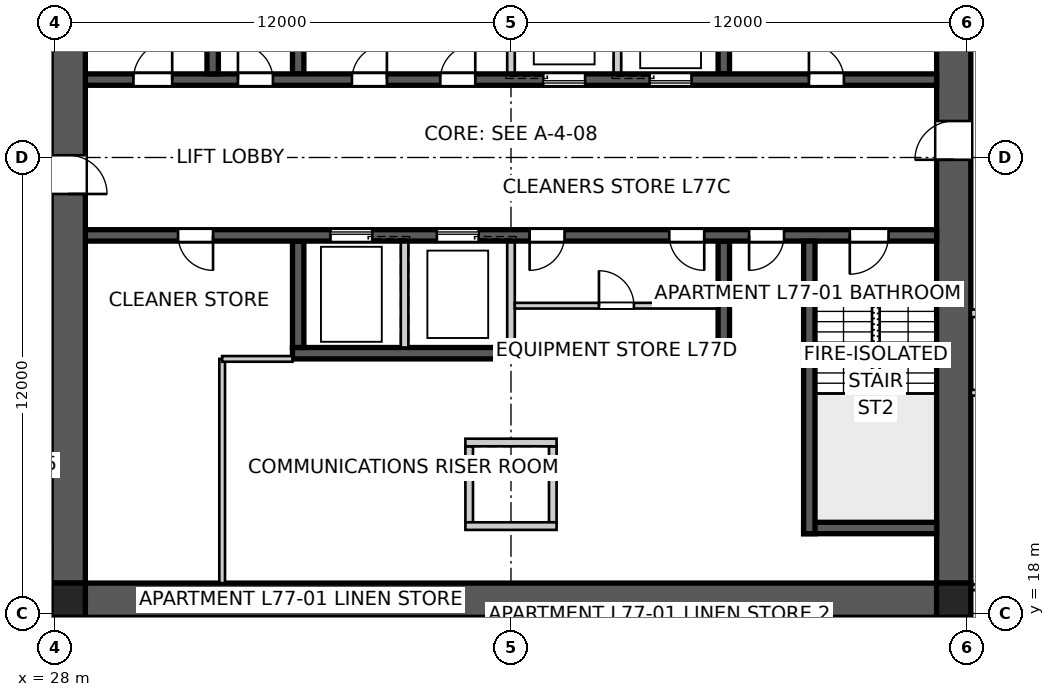
"""IFC4 building model, lengths in metres.
Left out: names, types, materials, properties, quantities, classifications, styles, units other than length and angle.
Written with IfcOpenShell. Run it as: python <this file> out.ifc"""

import sys

from ifc_helpers import new_model, si_unit, direction, frame, frame_2d, origin, origin_2d, place, context, subcontext, project, spatial, polyline, rectangle, outline, extrude, element, fill, save


model = new_model("IFC4")
c1 = context("Model", 3, precision=1e-05, world=origin(), true_north=direction((0.0, 1.0)))
c2 = subcontext(c1, "Body", "Model", "MODEL_VIEW")
j1 = project(units=[si_unit("LENGTHUNIT", "METRE"), si_unit("PLANEANGLEUNIT", "RADIAN")], contexts=[c1])
p1 = place(None, origin())
s1 = spatial("IfcSite", under=j1, at=p1, CompositionType="ELEMENT")
p2 = place(p1, origin())
s2 = spatial("IfcBuilding", under=s1, at=p2, CompositionType="ELEMENT")
p3 = place(p2, frame((0.0, 0.0, 279.4)))
s3 = spatial("IfcBuildingStorey", under=s2, at=p3, CompositionType="ELEMENT", Elevation=279.4)
p4 = place(p3, frame((51.2, 18.35, 0.0), z_axis=(0.0, 0.0, 1.0), x_axis=(-1.0, 0.0, 0.0)))
e1 = element("IfcWall", 1, at=p4, inside=s3, PredefinedType="SHEAR", context=c2, shape_type="SweptSolid", body=[
    extrude(outline(polyline([(0.0, -0.45), (22.4, -0.45), (22.4, -0.025), (22.85, -0.025), (22.85, 0.025), (22.4, 0.025), (22.4, 0.45), (0.0, 0.45), (0.0, 0.025), (-0.45, 0.025), (-0.45, -0.025), (0.0, -0.025), (0.0, -0.45)])), origin(), (0.0, 0.0, 1.0), 3.4),
])
p5 = place(p3, frame((51.65, 18.8, 0.0), z_axis=(0.0, 0.0, 1.0), x_axis=(0.0, 1.0, 0.0)))
e2 = element("IfcWall", 2, at=p5, inside=s3, PredefinedType="SHEAR", context=c2, shape_type="SweptSolid", body=[
    extrude(outline(polyline([(0.0, -0.45), (22.4, -0.45), (22.4, -0.025), (22.85, -0.025), (22.85, 0.025), (22.4, 0.025), (22.4, 0.45), (0.0, 0.45), (0.0, 0.025), (-0.45, 0.025), (-0.45, -0.025), (0.0, -0.025), (0.0, -0.45)])), origin(), (0.0, 0.0, 1.0), 3.4),
])
p6 = place(p5, frame((11.14, 0.0, 0.0)))
e3 = element("IfcOpeningElement", 3, at=p6, cuts=e2, PredefinedType="OPENING", context=c2, shape_type="SweptSolid", body=[
    extrude(rectangle(XDim=1.02, YDim=2.4, at=frame_2d((0.51, 1.2))), frame((0.0, 0.46, 0.0), z_axis=(0.0, -1.0, 0.0), x_axis=(1.0, 0.0, 0.0)), (0.0, 0.0, 1.0), 0.92),
])
p7 = place(p3, frame((28.35, 41.2, 0.0), z_axis=(0.0, 0.0, 1.0), x_axis=(0.0, -1.0, 0.0)))
e4 = element("IfcWall", 4, at=p7, inside=s3, PredefinedType="SHEAR", context=c2, shape_type="SweptSolid", body=[
    extrude(outline(polyline([(0.0, -0.45), (22.4, -0.45), (22.4, -0.025), (22.85, -0.025), (22.85, 0.025), (22.4, 0.025), (22.4, 0.45), (0.0, 0.45), (0.0, 0.025), (-0.45, 0.025), (-0.45, -0.025), (0.0, -0.025), (0.0, -0.45)])), origin(), (0.0, 0.0, 1.0), 3.4),
])
p8 = place(p7, frame((11.14, 0.0, 0.0)))
e5 = element("IfcOpeningElement", 5, at=p8, cuts=e4, PredefinedType="OPENING", context=c2, shape_type="SweptSolid", body=[
    extrude(rectangle(XDim=1.02, YDim=2.4, at=frame_2d((0.51, 1.2))), frame((0.0, 0.46, 0.0), z_axis=(0.0, -1.0, 0.0), x_axis=(1.0, 0.0, 0.0)), (0.0, 0.0, 1.0), 0.92),
])
p9 = place(p3, frame((28.8, 32.05, 0.0), z_axis=(0.0, 0.0, 1.0), x_axis=(1.0, 0.0, 0.0)))
e6 = element("IfcWall", 6, at=p9, inside=s3, PredefinedType="SHEAR", context=c2, shape_type="SweptSolid", body=[
    extrude(rectangle(XDim=22.4, YDim=0.3, at=frame_2d((11.2, 0.0))), origin(), (0.0, 0.0, 1.0), 3.4),
])
p10 = place(p9, frame((19.04, 0.0, 0.0)))
e7 = element("IfcOpeningElement", 7, at=p10, cuts=e6, PredefinedType="OPENING", context=c2, shape_type="SweptSolid", body=[
    extrude(rectangle(XDim=0.92, YDim=2.1, at=frame_2d((0.46, 1.05))), frame((0.0, 0.16, 0.0), z_axis=(0.0, -1.0, 0.0), x_axis=(1.0, 0.0, 0.0)), (0.0, 0.0, 1.0), 0.32),
])
p11 = place(p9, frame((1.265, 0.0, 0.0)))
e8 = element("IfcOpeningElement", 8, at=p11, cuts=e6, PredefinedType="OPENING", context=c2, shape_type="SweptSolid", body=[
    extrude(rectangle(XDim=1.02, YDim=2.1, at=frame_2d((0.51, 1.05))), frame((0.0, 0.16, 0.0), z_axis=(0.0, -1.0, 0.0), x_axis=(1.0, 0.0, 0.0)), (0.0, 0.0, 1.0), 0.32),
])
p12 = place(p9, frame((4.015, 0.0, 0.0)))
e9 = element("IfcOpeningElement", 9, at=p12, cuts=e6, PredefinedType="OPENING", context=c2, shape_type="SweptSolid", body=[
    extrude(rectangle(XDim=0.92, YDim=2.1, at=frame_2d((0.46, 1.05))), frame((0.0, 0.16, 0.0), z_axis=(0.0, -1.0, 0.0), x_axis=(1.0, 0.0, 0.0)), (0.0, 0.0, 1.0), 0.32),
])
p13 = place(p9, frame((7.015, 0.0, 0.0)))
e10 = element("IfcOpeningElement", 10, at=p13, cuts=e6, PredefinedType="OPENING", context=c2, shape_type="SweptSolid", body=[
    extrude(rectangle(XDim=0.92, YDim=2.1, at=frame_2d((0.46, 1.05))), frame((0.0, 0.16, 0.0), z_axis=(0.0, -1.0, 0.0), x_axis=(1.0, 0.0, 0.0)), (0.0, 0.0, 1.0), 0.32),
])
p14 = place(p9, frame((9.34, 0.0, 0.0)))
e11 = element("IfcOpeningElement", 11, at=p14, cuts=e6, PredefinedType="OPENING", context=c2, shape_type="SweptSolid", body=[
    extrude(rectangle(XDim=0.92, YDim=2.1, at=frame_2d((0.46, 1.05))), frame((0.0, 0.16, 0.0), z_axis=(0.0, -1.0, 0.0), x_axis=(1.0, 0.0, 0.0)), (0.0, 0.0, 1.0), 0.32),
])
p15 = place(p9, frame((12.05, 0.0, 0.0)))
e12 = element("IfcOpeningElement", 12, at=p15, cuts=e6, PredefinedType="OPENING", context=c2, shape_type="SweptSolid", body=[
    extrude(rectangle(XDim=1.1, YDim=2.1, at=frame_2d((0.55, 1.05))), frame((0.0, 0.16, 0.0), z_axis=(0.0, -1.0, 0.0), x_axis=(1.0, 0.0, 0.0)), (0.0, 0.0, 1.0), 0.32),
])
p16 = place(p9, frame((14.85, 0.0, 0.0)))
e13 = element("IfcOpeningElement", 13, at=p16, cuts=e6, PredefinedType="OPENING", context=c2, shape_type="SweptSolid", body=[
    extrude(rectangle(XDim=1.1, YDim=2.1, at=frame_2d((0.55, 1.05))), frame((0.0, 0.16, 0.0), z_axis=(0.0, -1.0, 0.0), x_axis=(1.0, 0.0, 0.0)), (0.0, 0.0, 1.0), 0.32),
])
p17 = place(p3, frame((51.2, 27.95, 0.0), z_axis=(0.0, 0.0, 1.0), x_axis=(-1.0, 0.0, 0.0)))
e14 = element("IfcWall", 14, at=p17, inside=s3, PredefinedType="SHEAR", context=c2, shape_type="SweptSolid", body=[
    extrude(rectangle(XDim=22.4, YDim=0.3, at=frame_2d((11.2, 0.0))), origin(), (0.0, 0.0, 1.0), 3.4),
])
p18 = place(p17, frame((19.04, 0.0, 0.0)))
e15 = element("IfcOpeningElement", 15, at=p18, cuts=e14, PredefinedType="OPENING", context=c2, shape_type="SweptSolid", body=[
    extrude(rectangle(XDim=0.92, YDim=2.1, at=frame_2d((0.46, 1.05))), frame((0.0, 0.16, 0.0), z_axis=(0.0, -1.0, 0.0), x_axis=(1.0, 0.0, 0.0)), (0.0, 0.0, 1.0), 0.32),
])
p19 = place(p17, frame((1.265, 0.0, 0.0)))
e16 = element("IfcOpeningElement", 16, at=p19, cuts=e14, PredefinedType="OPENING", context=c2, shape_type="SweptSolid", body=[
    extrude(rectangle(XDim=1.02, YDim=2.1, at=frame_2d((0.51, 1.05))), frame((0.0, 0.16, 0.0), z_axis=(0.0, -1.0, 0.0), x_axis=(1.0, 0.0, 0.0)), (0.0, 0.0, 1.0), 0.32),
])
p20 = place(p17, frame((4.015, 0.0, 0.0)))
e17 = element("IfcOpeningElement", 17, at=p20, cuts=e14, PredefinedType="OPENING", context=c2, shape_type="SweptSolid", body=[
    extrude(rectangle(XDim=0.92, YDim=2.1, at=frame_2d((0.46, 1.05))), frame((0.0, 0.16, 0.0), z_axis=(0.0, -1.0, 0.0), x_axis=(1.0, 0.0, 0.0)), (0.0, 0.0, 1.0), 0.32),
])
p21 = place(p17, frame((9.79, 0.0, 0.0)))
e18 = element("IfcOpeningElement", 18, at=p21, cuts=e14, PredefinedType="OPENING", context=c2, shape_type="SweptSolid", body=[
    extrude(rectangle(XDim=0.92, YDim=2.1, at=frame_2d((0.46, 1.05))), frame((0.0, 0.16, 0.0), z_axis=(0.0, -1.0, 0.0), x_axis=(1.0, 0.0, 0.0)), (0.0, 0.0, 1.0), 0.32),
])
p22 = place(p17, frame((6.115, 0.0, 0.0)))
e19 = element("IfcOpeningElement", 19, at=p22, cuts=e14, PredefinedType="OPENING", context=c2, shape_type="SweptSolid", body=[
    extrude(rectangle(XDim=0.92, YDim=2.1, at=frame_2d((0.46, 1.05))), frame((0.0, 0.16, 0.0), z_axis=(0.0, -1.0, 0.0), x_axis=(1.0, 0.0, 0.0)), (0.0, 0.0, 1.0), 0.32),
])
p23 = place(p17, frame((12.05, 0.0, 0.0)))
e20 = element("IfcOpeningElement", 20, at=p23, cuts=e14, PredefinedType="OPENING", context=c2, shape_type="SweptSolid", body=[
    extrude(rectangle(XDim=1.1, YDim=2.1, at=frame_2d((0.55, 1.05))), frame((0.0, 0.16, 0.0), z_axis=(0.0, -1.0, 0.0), x_axis=(1.0, 0.0, 0.0)), (0.0, 0.0, 1.0), 0.32),
])
p24 = place(p17, frame((14.85, 0.0, 0.0)))
e21 = element("IfcOpeningElement", 21, at=p24, cuts=e14, PredefinedType="OPENING", context=c2, shape_type="SweptSolid", body=[
    extrude(rectangle(XDim=1.1, YDim=2.1, at=frame_2d((0.55, 1.05))), frame((0.0, 0.16, 0.0), z_axis=(0.0, -1.0, 0.0), x_axis=(1.0, 0.0, 0.0)), (0.0, 0.0, 1.0), 0.32),
])
p25 = place(p3, frame((45.75, 24.85, 0.0), z_axis=(0.0, 0.0, 1.0), x_axis=(-1.0, 0.0, 0.0)))
e22 = element("IfcWall", 22, at=p25, inside=s3, PredefinedType="SHEAR", context=c2, shape_type="SweptSolid", body=[
    extrude(rectangle(XDim=11.5, YDim=0.3, at=frame_2d((5.75, 0.0))), origin(), (0.0, 0.0, 1.0), 3.4),
])
for number, where, z_axis, x_axis in (
    (23, (34.4, 32.2, 0.0), (0.0, 0.0, 1.0), (0.0, 1.0, 0.0)),
    (24, (45.6, 27.8, 0.0), (0.0, 0.0, 1.0), (0.0, -1.0, 0.0)),
):
    element("IfcWall", number, at=place(p3, frame(where, z_axis=z_axis, x_axis=x_axis)), inside=s3, PredefinedType="SHEAR", context=c2, shape_type="SweptSolid", body=[
        extrude(rectangle(XDim=2.8, YDim=0.3, at=frame_2d((1.4, 0.0))), origin(), (0.0, 0.0, 1.0), 3.4),
    ])
for number, where, z_axis, x_axis in (
    (25, (40.0, 32.2, 0.0), (0.0, 0.0, 1.0), (0.0, 1.0, 0.0)),
    (26, (40.0, 27.8, 0.0), (0.0, 0.0, 1.0), (0.0, -1.0, 0.0)),
    (27, (42.8, 32.2, 0.0), (0.0, 0.0, 1.0), (0.0, 1.0, 0.0)),
    (28, (37.2, 27.8, 0.0), (0.0, 0.0, 1.0), (0.0, -1.0, 0.0)),
):
    element("IfcWall", number, at=place(p3, frame(where, z_axis=z_axis, x_axis=x_axis)), inside=s3, PredefinedType="SOLIDWALL", context=c2, shape_type="SweptSolid", body=[
        extrude(rectangle(XDim=2.8, YDim=0.2, at=frame_2d((1.4, 0.0))), origin(), (0.0, 0.0, 1.0), 3.4),
    ])
for number, where, z_axis, x_axis in (
    (29, (45.6, 32.2, 0.0), (0.0, 0.0, 1.0), (0.0, 1.0, 0.0)),
    (30, (34.4, 27.8, 0.0), (0.0, 0.0, 1.0), (0.0, -1.0, 0.0)),
):
    element("IfcWall", number, at=place(p3, frame(where, z_axis=z_axis, x_axis=x_axis)), inside=s3, PredefinedType="SHEAR", context=c2, shape_type="SweptSolid", body=[
        extrude(rectangle(XDim=2.8, YDim=0.3, at=frame_2d((1.4, 0.0))), origin(), (0.0, 0.0, 1.0), 3.4),
    ])
for number, where, z_axis, x_axis in (
    (31, (32.15, 32.2, 0.0), (0.0, 0.0, 1.0), (0.0, 1.0, 0.0)),
    (32, (47.85, 27.8, 0.0), (0.0, 0.0, 1.0), (0.0, -1.0, 0.0)),
):
    element("IfcWall", number, at=place(p3, frame(where, z_axis=z_axis, x_axis=x_axis)), inside=s3, PredefinedType="SHEAR", context=c2, shape_type="SweptSolid", body=[
        extrude(rectangle(XDim=7.7, YDim=0.3, at=frame_2d((3.85, 0.0))), origin(), (0.0, 0.0, 1.0), 3.4),
    ])
p26 = place(p3, frame((51.2, 20.25, 0.0), z_axis=(0.0, 0.0, 1.0), x_axis=(-1.0, 0.0, 0.0)))
e33 = element("IfcWall", 33, at=p26, inside=s3, PredefinedType="SHEAR", context=c2, shape_type="SweptSolid", body=[
    extrude(rectangle(XDim=3.5, YDim=0.3, at=frame_2d((1.75, 0.0))), origin(), (0.0, 0.0, 1.0), 3.4),
])
for number, where, z_axis, x_axis in (
    (34, (38.9, 22.4, 0.0), (0.0, 0.0, 1.0), (0.0, -1.0, 0.0)),
    (35, (41.1, 22.4, 0.0), (0.0, 0.0, 1.0), (0.0, -1.0, 0.0)),
):
    element("IfcWall", number, at=place(p3, frame(where, z_axis=z_axis, x_axis=x_axis)), inside=s3, PredefinedType="SOLIDWALL", context=c2, shape_type="SweptSolid", body=[
        extrude(rectangle(XDim=2.0, YDim=0.2, at=frame_2d((1.0, 0.0))), origin(), (0.0, 0.0, 1.0), 3.4),
    ])
for number, where, z_axis, x_axis in (
    (36, (38.8, 22.5, 0.0), (0.0, 0.0, 1.0), (1.0, 0.0, 0.0)),
    (37, (38.8, 20.3, 0.0), (0.0, 0.0, 1.0), (1.0, 0.0, 0.0)),
):
    element("IfcWall", number, at=place(p3, frame(where, z_axis=z_axis, x_axis=x_axis)), inside=s3, PredefinedType="SOLIDWALL", context=c2, shape_type="SweptSolid", body=[
        extrude(rectangle(XDim=2.4, YDim=0.2, at=frame_2d((1.2, 0.0))), origin(), (0.0, 0.0, 1.0), 3.4),
    ])
for number, where, z_axis, x_axis in (
    (38, (28.35, 18.35, 0.0), (0.0, 0.0, 1.0), (1.0, 0.0, 0.0)),
    (39, (51.65, 18.35, 0.0), (0.0, 0.0, 1.0), (1.0, 0.0, 0.0)),
):
    element("IfcColumn", number, at=place(p3, frame(where, z_axis=z_axis, x_axis=x_axis)), inside=s3, PredefinedType="COLUMN", context=c2, shape_type="SweptSolid", body=[
        extrude(rectangle(XDim=0.9, YDim=0.9, at=origin_2d()), origin(), (0.0, 0.0, 1.0), 3.4),
    ])
p27 = place(p3, frame((52.1, 25.9, 0.0), z_axis=(0.0, 0.0, 1.0), x_axis=(1.0, 0.0, 0.0)))
e40 = element("IfcWall", 40, at=p27, inside=s3, PredefinedType="PARTITIONING", context=c2, shape_type="SweptSolid", body=[
    extrude(rectangle(XDim=2.5, YDim=0.2, at=frame_2d((1.25, 0.0))), origin(), (0.0, 0.0, 1.0), 3.25),
])
p28 = place(p3, frame((24.296, 16.823, 0.0), z_axis=(0.0, 0.0, 1.0), x_axis=(0.76603440109, 0.64279957712, 0.0)))
e41 = element("IfcWall", 41, at=p28, inside=s3, PredefinedType="PARTITIONING", context=c2, shape_type="SweptSolid", body=[
    extrude(rectangle(XDim=4.64, YDim=0.25, at=frame_2d((2.32, 0.0))), origin(), (0.0, 0.0, 1.0), 3.25),
])
p29 = place(p3, frame((32.4, 18.8, 0.0), z_axis=(0.0, 0.0, 1.0), x_axis=(0.0, 1.0, 0.0)))
e42 = element("IfcWall", 42, at=p29, inside=s3, PredefinedType="SOLIDWALL", context=c2, shape_type="SweptSolid", body=[
    extrude(rectangle(XDim=5.9, YDim=0.15, at=frame_2d((2.95, 0.0))), origin(), (0.0, 0.0, 1.0), 3.25),
])
p30 = place(p3, frame((32.4, 24.7, 0.0), z_axis=(0.0, 0.0, 1.0), x_axis=(1.0, 0.0, 0.0)))
e43 = element("IfcWall", 43, at=p30, inside=s3, PredefinedType="SOLIDWALL", context=c2, shape_type="SweptSolid", body=[
    extrude(rectangle(XDim=1.85, YDim=0.15, at=frame_2d((0.925, 0.0))), origin(), (0.0, 0.0, 1.0), 3.25),
])
p31 = place(p3, frame((57.0, 23.81, 0.0), z_axis=(0.0, 0.0, 1.0), x_axis=(-1.0, 0.0, 0.0)))
e44 = element("IfcWall", 44, at=p31, inside=s3, PredefinedType="SOLIDWALL", context=c2, shape_type="SweptSolid", body=[
    extrude(rectangle(XDim=4.9, YDim=0.15, at=frame_2d((2.45, 0.0))), origin(), (0.0, 0.0, 1.0), 3.25),
])
p32 = place(p31, frame((1.97, 0.0, 0.0)))
e45 = element("IfcOpeningElement", 45, at=p32, cuts=e44, PredefinedType="OPENING", context=c2, shape_type="SweptSolid", body=[
    extrude(rectangle(XDim=0.96, YDim=2.1, at=frame_2d((0.48, 1.05))), frame((0.0, 0.085, 0.0), z_axis=(0.0, -1.0, 0.0), x_axis=(1.0, 0.0, 0.0)), (0.0, 0.0, 1.0), 0.17),
])
p33 = place(p3, frame((51.18, 18.689, 0.0), z_axis=(0.0, 0.0, 1.0), x_axis=(1.0, 0.0, 0.0)))
e46 = element("IfcWall", 46, at=p33, inside=s3, PredefinedType="SOLIDWALL", context=c2, shape_type="SweptSolid", body=[
    extrude(rectangle(XDim=5.82, YDim=0.15, at=frame_2d((2.91, 0.0))), origin(), (0.0, 0.0, 1.0), 3.25),
])
p34 = place(p33, frame((2.91, 0.0, 0.0)))
e47 = element("IfcOpeningElement", 47, at=p34, cuts=e46, PredefinedType="OPENING", context=c2, shape_type="SweptSolid", body=[
    extrude(rectangle(XDim=0.92, YDim=2.1, at=frame_2d((0.46, 1.05))), frame((0.0, 0.085, 0.0), z_axis=(0.0, -1.0, 0.0), x_axis=(1.0, 0.0, 0.0)), (0.0, 0.0, 1.0), 0.17),
])
p35 = place(p3, frame((40.1, 26.1, 0.0), z_axis=(0.0, 0.0, 1.0), x_axis=(1.0, 0.0, 0.0)))
e48 = element("IfcWall", 48, at=p35, inside=s3, PredefinedType="SOLIDWALL", context=c2, shape_type="SweptSolid", body=[
    extrude(rectangle(XDim=5.35, YDim=0.15, at=frame_2d((2.675, 0.0))), origin(), (0.0, 0.0, 1.0), 3.25),
])
p36 = place(p35, frame((2.215, 0.0, 0.0)))
e49 = element("IfcOpeningElement", 49, at=p36, cuts=e48, PredefinedType="OPENING", context=c2, shape_type="SweptSolid", body=[
    extrude(rectangle(XDim=0.92, YDim=2.1, at=frame_2d((0.46, 1.05))), frame((0.0, 0.085, 0.0), z_axis=(0.0, -1.0, 0.0), x_axis=(1.0, 0.0, 0.0)), (0.0, 0.0, 1.0), 0.17),
])
p37 = place(p10, origin())
e50 = element("IfcDoor", 50, at=p37, inside=s3, OperationType="SINGLE_SWING_LEFT", PredefinedType="DOOR", context=c2, shape_type="SweptSolid", body=[
    extrude(rectangle(XDim=0.92, YDim=2.1, at=frame_2d((0.46, 1.05))), frame((0.0, 0.025, 0.0), z_axis=(0.0, -1.0, 0.0), x_axis=(1.0, 0.0, 0.0)), (0.0, 0.0, 1.0), 0.05),
])
fill(e7, e50)
p38 = place(p18, origin())
e51 = element("IfcDoor", 51, at=p38, inside=s3, OperationType="SINGLE_SWING_LEFT", PredefinedType="DOOR", context=c2, shape_type="SweptSolid", body=[
    extrude(rectangle(XDim=0.92, YDim=2.1, at=frame_2d((0.46, 1.05))), frame((0.0, 0.025, 0.0), z_axis=(0.0, -1.0, 0.0), x_axis=(1.0, 0.0, 0.0)), (0.0, 0.0, 1.0), 0.05),
])
fill(e15, e51)
p39 = place(p19, origin())
e52 = element("IfcDoor", 52, at=p39, inside=s3, OperationType="SINGLE_SWING_RIGHT", PredefinedType="DOOR", context=c2, shape_type="SweptSolid", body=[
    extrude(rectangle(XDim=1.02, YDim=2.1, at=frame_2d((0.51, 1.05))), frame((0.0, 0.025, 0.0), z_axis=(0.0, -1.0, 0.0), x_axis=(1.0, 0.0, 0.0)), (0.0, 0.0, 1.0), 0.05),
])
fill(e16, e52)
p40 = place(p11, origin())
e53 = element("IfcDoor", 53, at=p40, inside=s3, OperationType="SINGLE_SWING_RIGHT", PredefinedType="DOOR", context=c2, shape_type="SweptSolid", body=[
    extrude(rectangle(XDim=1.02, YDim=2.1, at=frame_2d((0.51, 1.05))), frame((0.0, 0.025, 0.0), z_axis=(0.0, -1.0, 0.0), x_axis=(1.0, 0.0, 0.0)), (0.0, 0.0, 1.0), 0.05),
])
fill(e8, e53)
p41 = place(p12, origin())
e54 = element("IfcDoor", 54, at=p41, inside=s3, OperationType="SINGLE_SWING_LEFT", PredefinedType="DOOR", context=c2, shape_type="SweptSolid", body=[
    extrude(rectangle(XDim=0.92, YDim=2.1, at=frame_2d((0.46, 1.05))), frame((0.0, 0.025, 0.0), z_axis=(0.0, -1.0, 0.0), x_axis=(1.0, 0.0, 0.0)), (0.0, 0.0, 1.0), 0.05),
])
fill(e9, e54)
p42 = place(p20, origin())
e55 = element("IfcDoor", 55, at=p42, inside=s3, OperationType="SINGLE_SWING_RIGHT", PredefinedType="DOOR", context=c2, shape_type="SweptSolid", body=[
    extrude(rectangle(XDim=0.92, YDim=2.1, at=frame_2d((0.46, 1.05))), frame((0.0, 0.025, 0.0), z_axis=(0.0, -1.0, 0.0), x_axis=(1.0, 0.0, 0.0)), (0.0, 0.0, 1.0), 0.05),
])
fill(e17, e55)
p43 = place(p13, origin())
e56 = element("IfcDoor", 56, at=p43, inside=s3, OperationType="SINGLE_SWING_RIGHT", PredefinedType="DOOR", context=c2, shape_type="SweptSolid", body=[
    extrude(rectangle(XDim=0.92, YDim=2.1, at=frame_2d((0.46, 1.05))), frame((0.0, 0.025, 0.0), z_axis=(0.0, -1.0, 0.0), x_axis=(1.0, 0.0, 0.0)), (0.0, 0.0, 1.0), 0.05),
])
fill(e10, e56)
p44 = place(p14, origin())
e57 = element("IfcDoor", 57, at=p44, inside=s3, OperationType="SINGLE_SWING_RIGHT", PredefinedType="DOOR", context=c2, shape_type="SweptSolid", body=[
    extrude(rectangle(XDim=0.92, YDim=2.1, at=frame_2d((0.46, 1.05))), frame((0.0, 0.025, 0.0), z_axis=(0.0, -1.0, 0.0), x_axis=(1.0, 0.0, 0.0)), (0.0, 0.0, 1.0), 0.05),
])
fill(e11, e57)
p45 = place(p21, origin())
e58 = element("IfcDoor", 58, at=p45, inside=s3, OperationType="SINGLE_SWING_RIGHT", PredefinedType="DOOR", context=c2, shape_type="SweptSolid", body=[
    extrude(rectangle(XDim=0.92, YDim=2.1, at=frame_2d((0.46, 1.05))), frame((0.0, 0.025, 0.0), z_axis=(0.0, -1.0, 0.0), x_axis=(1.0, 0.0, 0.0)), (0.0, 0.0, 1.0), 0.05),
])
fill(e18, e58)
p46 = place(p22, origin())
e59 = element("IfcDoor", 59, at=p46, inside=s3, OperationType="SINGLE_SWING_LEFT", PredefinedType="DOOR", context=c2, shape_type="SweptSolid", body=[
    extrude(rectangle(XDim=0.92, YDim=2.1, at=frame_2d((0.46, 1.05))), frame((0.0, 0.025, 0.0), z_axis=(0.0, -1.0, 0.0), x_axis=(1.0, 0.0, 0.0)), (0.0, 0.0, 1.0), 0.05),
])
fill(e19, e59)
p47 = place(p36, origin())
e60 = element("IfcDoor", 60, at=p47, inside=s3, OperationType="SINGLE_SWING_LEFT", PredefinedType="DOOR", context=c2, shape_type="SweptSolid", body=[
    extrude(rectangle(XDim=0.92, YDim=2.1, at=frame_2d((0.46, 1.05))), frame((0.0, 0.025, 0.0), z_axis=(0.0, -1.0, 0.0), x_axis=(1.0, 0.0, 0.0)), (0.0, 0.0, 1.0), 0.05),
])
fill(e49, e60)
p48 = place(p6, origin())
e61 = element("IfcDoor", 61, at=p48, inside=s3, OperationType="SINGLE_SWING_LEFT", PredefinedType="DOOR", context=c2, shape_type="SweptSolid", body=[
    extrude(rectangle(XDim=1.02, YDim=2.4, at=frame_2d((0.51, 1.2))), frame((0.0, 0.025, 0.0), z_axis=(0.0, -1.0, 0.0), x_axis=(1.0, 0.0, 0.0)), (0.0, 0.0, 1.0), 0.05),
])
fill(e3, e61)
p49 = place(p8, origin())
e62 = element("IfcDoor", 62, at=p49, inside=s3, OperationType="SINGLE_SWING_RIGHT", PredefinedType="DOOR", context=c2, shape_type="SweptSolid", body=[
    extrude(rectangle(XDim=1.02, YDim=2.4, at=frame_2d((0.51, 1.2))), frame((0.0, 0.025, 0.0), z_axis=(0.0, -1.0, 0.0), x_axis=(1.0, 0.0, 0.0)), (0.0, 0.0, 1.0), 0.05),
])
fill(e5, e62)
p50 = place(p15, origin())
e63 = element("IfcDoor", 63, at=p50, inside=s3, OperationType="SLIDING_TO_LEFT", PredefinedType="DOOR", context=c2, shape_type="SweptSolid", body=[
    extrude(rectangle(XDim=1.1, YDim=2.1, at=frame_2d((0.55, 1.05))), frame((0.0, 0.025, 0.0), z_axis=(0.0, -1.0, 0.0), x_axis=(1.0, 0.0, 0.0)), (0.0, 0.0, 1.0), 0.05),
])
fill(e12, e63)
p51 = place(p23, origin())
e64 = element("IfcDoor", 64, at=p51, inside=s3, OperationType="SLIDING_TO_LEFT", PredefinedType="DOOR", context=c2, shape_type="SweptSolid", body=[
    extrude(rectangle(XDim=1.1, YDim=2.1, at=frame_2d((0.55, 1.05))), frame((0.0, 0.025, 0.0), z_axis=(0.0, -1.0, 0.0), x_axis=(1.0, 0.0, 0.0)), (0.0, 0.0, 1.0), 0.05),
])
fill(e20, e64)
p52 = place(p16, origin())
e65 = element("IfcDoor", 65, at=p52, inside=s3, OperationType="SLIDING_TO_LEFT", PredefinedType="DOOR", context=c2, shape_type="SweptSolid", body=[
    extrude(rectangle(XDim=1.1, YDim=2.1, at=frame_2d((0.55, 1.05))), frame((0.0, 0.025, 0.0), z_axis=(0.0, -1.0, 0.0), x_axis=(1.0, 0.0, 0.0)), (0.0, 0.0, 1.0), 0.05),
])
fill(e13, e65)
p53 = place(p24, origin())
e66 = element("IfcDoor", 66, at=p53, inside=s3, OperationType="SLIDING_TO_LEFT", PredefinedType="DOOR", context=c2, shape_type="SweptSolid", body=[
    extrude(rectangle(XDim=1.1, YDim=2.1, at=frame_2d((0.55, 1.05))), frame((0.0, 0.025, 0.0), z_axis=(0.0, -1.0, 0.0), x_axis=(1.0, 0.0, 0.0)), (0.0, 0.0, 1.0), 0.05),
])
fill(e21, e66)
save(model, sys.argv[1])
